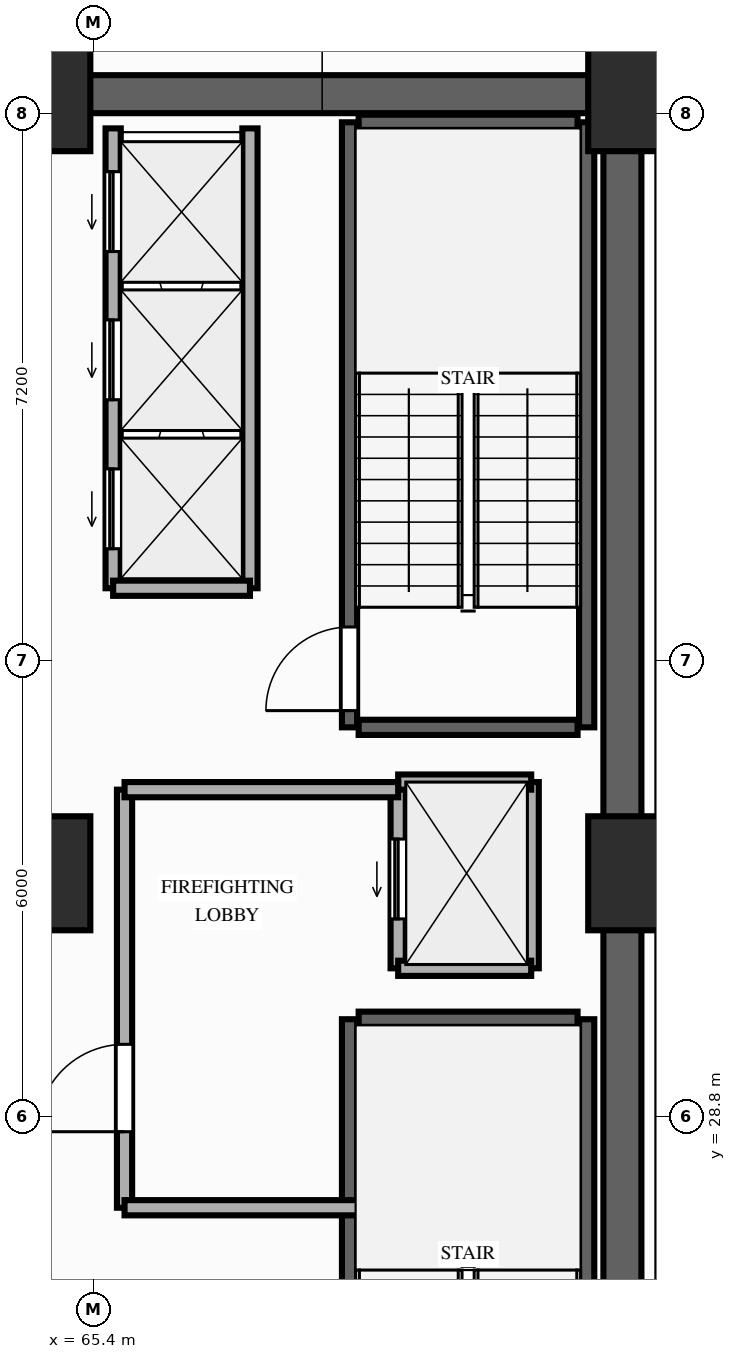
"""IFC4 building model, lengths in metres.
Left out: names, types, materials, properties, quantities, classifications, styles, units other than length and angle.
Written with IfcOpenShell. Run it as: python <this file> out.ifc"""

import sys

from ifc_helpers import new_model, si_unit, direction, frame, frame_2d, origin, origin_2d, place, context, subcontext, project, spatial, rectangle, extrude, element, fill, save


model = new_model("IFC4")
c1 = context("Model", 3, precision=1e-05, world=origin(), true_north=direction((0.0, 1.0)))
c2 = subcontext(c1, "Body", "Model", "MODEL_VIEW")
j1 = project(units=[si_unit("LENGTHUNIT", "METRE"), si_unit("PLANEANGLEUNIT", "RADIAN")], contexts=[c1])
p1 = place(None, origin())
s1 = spatial("IfcSite", under=j1, at=p1, CompositionType="ELEMENT")
p2 = place(p1, origin())
s2 = spatial("IfcBuilding", under=s1, at=p2, CompositionType="ELEMENT")
p3 = place(p2, frame((0.0, 0.0, 8.8)))
s3 = spatial("IfcBuildingStorey", under=s2, at=p3, CompositionType="ELEMENT", Elevation=8.8)
for number, where, z_axis, x_axis in (
    (1, (64.6, 32.0, 0.0), (0.0, 0.0, 1.0), (1.0, 0.0, 0.0)),
    (2, (72.65, 32.0, 0.0), (0.0, 0.0, 1.0), (1.0, 0.0, 0.0)),
    (3, (64.6, 42.25, 0.0), (0.0, 0.0, 1.0), (1.0, 0.0, 0.0)),
    (4, (72.65, 42.25, 0.0), (0.0, 0.0, 1.0), (1.0, 0.0, 0.0)),
):
    element("IfcColumn", number, at=place(p3, frame(where, z_axis=z_axis, x_axis=x_axis)), inside=s3, PredefinedType="COLUMN", context=c2, shape_type="SweptSolid", body=[
        extrude(rectangle(XDim=1.5, YDim=1.5, at=origin_2d()), origin(), (0.0, 0.0, 1.0), 4.2),
    ])
p4 = place(p3, frame((72.35, 22.0, 0.0), z_axis=(0.0, 0.0, 1.0), x_axis=(0.0, 1.0, 0.0)))
e5 = element("IfcWall", 5, at=p4, inside=s3, PredefinedType="SHEAR", context=c2, shape_type="SweptSolid", body=[
    extrude(rectangle(XDim=20.25, YDim=0.5, at=frame_2d((10.125, 0.0))), origin(), (0.0, 0.0, 1.0), 3.95),
])
p5 = place(p3, frame((64.6, 42.25, 0.0), z_axis=(0.0, 0.0, 1.0), x_axis=(1.0, 0.0, 0.0)))
e6 = element("IfcWall", 6, at=p5, inside=s3, PredefinedType="SHEAR", context=c2, shape_type="SweptSolid", body=[
    extrude(rectangle(XDim=7.5, YDim=0.5, at=frame_2d((3.75, 0.0))), origin(), (0.0, 0.0, 1.0), 3.95),
])
p6 = place(p3, frame((68.76, 22.26, 0.0), z_axis=(0.0, 0.0, 1.0), x_axis=(0.0, 1.0, 0.0)))
e7 = element("IfcWall", 7, at=p6, inside=s3, PredefinedType="SHEAR", context=c2, shape_type="SweptSolid", body=[
    extrude(rectangle(XDim=7.82, YDim=0.2, at=frame_2d((3.91, 0.0))), origin(), (0.0, 0.0, 1.0), 3.95),
])
p7 = place(p6, frame((0.22, 0.0, 0.0)))
e8 = element("IfcOpeningElement", 8, at=p7, cuts=e7, PredefinedType="OPENING", context=c2, shape_type="SweptSolid", body=[
    extrude(rectangle(XDim=1.1, YDim=2.15, at=frame_2d((0.55, 1.075))), frame((0.0, 0.11, 0.0), z_axis=(0.0, -1.0, 0.0), x_axis=(1.0, 0.0, 0.0)), (0.0, 0.0, 1.0), 0.22),
])
p8 = place(p3, frame((71.88, 22.26, 0.0), z_axis=(0.0, 0.0, 1.0), x_axis=(0.0, 1.0, 0.0)))
e9 = element("IfcWall", 9, at=p8, inside=s3, PredefinedType="SHEAR", context=c2, shape_type="SweptSolid", body=[
    extrude(rectangle(XDim=7.82, YDim=0.2, at=frame_2d((3.91, 0.0))), origin(), (0.0, 0.0, 1.0), 3.95),
])
p9 = place(p3, frame((68.88, 30.08, 0.0), z_axis=(0.0, 0.0, 1.0), x_axis=(1.0, 0.0, 0.0)))
e10 = element("IfcWall", 10, at=p9, inside=s3, PredefinedType="SHEAR", context=c2, shape_type="SweptSolid", body=[
    extrude(rectangle(XDim=2.88, YDim=0.2, at=frame_2d((1.44, 0.0))), origin(), (0.0, 0.0, 1.0), 3.95),
])
p10 = place(p3, frame((68.76, 33.92, 0.0), z_axis=(0.0, 0.0, 1.0), x_axis=(0.0, 1.0, 0.0)))
e11 = element("IfcWall", 11, at=p10, inside=s3, PredefinedType="SHEAR", context=c2, shape_type="SweptSolid", body=[
    extrude(rectangle(XDim=7.96, YDim=0.2, at=frame_2d((3.98, 0.0))), origin(), (0.0, 0.0, 1.0), 3.95),
])
p11 = place(p10, frame((0.22, 0.0, 0.0)))
e12 = element("IfcOpeningElement", 12, at=p11, cuts=e11, PredefinedType="OPENING", context=c2, shape_type="SweptSolid", body=[
    extrude(rectangle(XDim=1.1, YDim=2.15, at=frame_2d((0.55, 1.075))), frame((0.0, 0.11, 0.0), z_axis=(0.0, -1.0, 0.0), x_axis=(1.0, 0.0, 0.0)), (0.0, 0.0, 1.0), 0.22),
])
p12 = place(p3, frame((71.88, 33.92, 0.0), z_axis=(0.0, 0.0, 1.0), x_axis=(0.0, 1.0, 0.0)))
e13 = element("IfcWall", 13, at=p12, inside=s3, PredefinedType="SHEAR", context=c2, shape_type="SweptSolid", body=[
    extrude(rectangle(XDim=7.96, YDim=0.2, at=frame_2d((3.98, 0.0))), origin(), (0.0, 0.0, 1.0), 3.95),
])
for number, where, z_axis, x_axis in (
    (14, (68.88, 41.88, 0.0), (0.0, 0.0, 1.0), (1.0, 0.0, 0.0)),
    (15, (68.88, 33.92, 0.0), (0.0, 0.0, 1.0), (1.0, 0.0, 0.0)),
):
    element("IfcWall", number, at=place(p3, frame(where, z_axis=z_axis, x_axis=x_axis)), inside=s3, PredefinedType="SHEAR", context=c2, shape_type="SweptSolid", body=[
        extrude(rectangle(XDim=2.88, YDim=0.2, at=frame_2d((1.44, 0.0))), origin(), (0.0, 0.0, 1.0), 3.95),
    ])
p13 = place(p3, frame((65.65, 35.75, 0.0), z_axis=(0.0, 0.0, 1.0), x_axis=(0.0, 1.0, 0.0)))
e16 = element("IfcWall", 16, at=p13, inside=s3, PredefinedType="MOVABLE", context=c2, shape_type="SweptSolid", body=[
    extrude(rectangle(XDim=6.05, YDim=0.2, at=frame_2d((3.025, 0.0))), origin(), (0.0, 0.0, 1.0), 3.95),
])
p14 = place(p13, frame((0.52, 0.0, 0.0)))
e17 = element("IfcOpeningElement", 17, at=p14, cuts=e16, PredefinedType="OPENING", context=c2, shape_type="SweptSolid", body=[
    extrude(rectangle(XDim=1.05, YDim=2.15, at=frame_2d((0.525, 1.075))), frame((0.0, 0.11, 0.0), z_axis=(0.0, -1.0, 0.0), x_axis=(1.0, 0.0, 0.0)), (0.0, 0.0, 1.0), 0.22),
])
p15 = place(p13, frame((2.48, 0.0, 0.0)))
e18 = element("IfcOpeningElement", 18, at=p15, cuts=e16, PredefinedType="OPENING", context=c2, shape_type="SweptSolid", body=[
    extrude(rectangle(XDim=1.05, YDim=2.15, at=frame_2d((0.525, 1.075))), frame((0.0, 0.11, 0.0), z_axis=(0.0, -1.0, 0.0), x_axis=(1.0, 0.0, 0.0)), (0.0, 0.0, 1.0), 0.22),
])
p16 = place(p13, frame((4.43, 0.0, 0.0)))
e19 = element("IfcOpeningElement", 19, at=p16, cuts=e16, PredefinedType="OPENING", context=c2, shape_type="SweptSolid", body=[
    extrude(rectangle(XDim=1.05, YDim=2.15, at=frame_2d((0.525, 1.075))), frame((0.0, 0.11, 0.0), z_axis=(0.0, -1.0, 0.0), x_axis=(1.0, 0.0, 0.0)), (0.0, 0.0, 1.0), 0.22),
])
p17 = place(p3, frame((67.45, 35.75, 0.0), z_axis=(0.0, 0.0, 1.0), x_axis=(0.0, 1.0, 0.0)))
e20 = element("IfcWall", 20, at=p17, inside=s3, PredefinedType="MOVABLE", context=c2, shape_type="SweptSolid", body=[
    extrude(rectangle(XDim=6.05, YDim=0.2, at=frame_2d((3.025, 0.0))), origin(), (0.0, 0.0, 1.0), 3.95),
])
p18 = place(p3, frame((65.65, 35.75, 0.0), z_axis=(0.0, 0.0, 1.0), x_axis=(1.0, 0.0, 0.0)))
e21 = element("IfcWall", 21, at=p18, inside=s3, PredefinedType="MOVABLE", context=c2, shape_type="SweptSolid", body=[
    extrude(rectangle(XDim=1.8, YDim=0.2, at=frame_2d((0.9, 0.0))), origin(), (0.0, 0.0, 1.0), 3.95),
])
p19 = place(p3, frame((69.4, 30.75, 0.0), z_axis=(0.0, 0.0, 1.0), x_axis=(0.0, 1.0, 0.0)))
e22 = element("IfcWall", 22, at=p19, inside=s3, PredefinedType="MOVABLE", context=c2, shape_type="SweptSolid", body=[
    extrude(rectangle(XDim=2.45, YDim=0.2, at=frame_2d((1.225, 0.0))), origin(), (0.0, 0.0, 1.0), 3.95),
])
p20 = place(p19, frame((0.65, 0.0, 0.0)))
e23 = element("IfcOpeningElement", 23, at=p20, cuts=e22, PredefinedType="OPENING", context=c2, shape_type="SweptSolid", body=[
    extrude(rectangle(XDim=1.05, YDim=2.15, at=frame_2d((0.525, 1.075))), frame((0.0, 0.11, 0.0), z_axis=(0.0, -1.0, 0.0), x_axis=(1.0, 0.0, 0.0)), (0.0, 0.0, 1.0), 0.22),
])
p21 = place(p3, frame((71.15, 30.75, 0.0), z_axis=(0.0, 0.0, 1.0), x_axis=(0.0, 1.0, 0.0)))
e24 = element("IfcWall", 24, at=p21, inside=s3, PredefinedType="MOVABLE", context=c2, shape_type="SweptSolid", body=[
    extrude(rectangle(XDim=2.45, YDim=0.2, at=frame_2d((1.225, 0.0))), origin(), (0.0, 0.0, 1.0), 3.95),
])
for number, where, z_axis, x_axis in (
    (25, (69.4, 33.2, 0.0), (0.0, 0.0, 1.0), (1.0, 0.0, 0.0)),
    (26, (69.4, 30.75, 0.0), (0.0, 0.0, 1.0), (1.0, 0.0, 0.0)),
):
    element("IfcWall", number, at=place(p3, frame(where, z_axis=z_axis, x_axis=x_axis)), inside=s3, PredefinedType="MOVABLE", context=c2, shape_type="SweptSolid", body=[
        extrude(rectangle(XDim=1.75, YDim=0.2, at=frame_2d((0.875, 0.0))), origin(), (0.0, 0.0, 1.0), 3.95),
    ])
p22 = place(p3, frame((65.8, 27.6, 0.0), z_axis=(0.0, 0.0, 1.0), x_axis=(0.0, 1.0, 0.0)))
e27 = element("IfcWall", 27, at=p22, inside=s3, PredefinedType="PARTITIONING", context=c2, shape_type="SweptSolid", body=[
    extrude(rectangle(XDim=5.5, YDim=0.2, at=frame_2d((2.75, 0.0))), origin(), (0.0, 0.0, 1.0), 3.95),
])
p23 = place(p22, frame((1.0, 0.0, 0.0)))
e28 = element("IfcOpeningElement", 28, at=p23, cuts=e27, PredefinedType="OPENING", context=c2, shape_type="SweptSolid", body=[
    extrude(rectangle(XDim=1.15, YDim=2.15, at=frame_2d((0.575, 1.075))), frame((0.0, 0.11, 0.0), z_axis=(0.0, -1.0, 0.0), x_axis=(1.0, 0.0, 0.0)), (0.0, 0.0, 1.0), 0.22),
])
p24 = place(p3, frame((65.8, 33.1, 0.0), z_axis=(0.0, 0.0, 1.0), x_axis=(1.0, 0.0, 0.0)))
e29 = element("IfcWall", 29, at=p24, inside=s3, PredefinedType="PARTITIONING", context=c2, shape_type="SweptSolid", body=[
    extrude(rectangle(XDim=3.6, YDim=0.2, at=frame_2d((1.8, 0.0))), origin(), (0.0, 0.0, 1.0), 3.95),
])
p25 = place(p3, frame((65.8, 27.6, 0.0), z_axis=(0.0, 0.0, 1.0), x_axis=(1.0, 0.0, 0.0)))
e30 = element("IfcWall", 30, at=p25, inside=s3, PredefinedType="PARTITIONING", context=c2, shape_type="SweptSolid", body=[
    extrude(rectangle(XDim=3.4, YDim=0.2, at=frame_2d((1.7, 0.0))), origin(), (0.0, 0.0, 1.0), 3.95),
])
p26 = place(p11, origin())
e31 = element("IfcDoor", 31, at=p26, inside=s3, OperationType="SINGLE_SWING_LEFT", PredefinedType="DOOR", context=c2, shape_type="SweptSolid", body=[
    extrude(rectangle(XDim=1.1, YDim=2.15, at=frame_2d((0.55, 1.075))), frame((0.0, 0.025, 0.0), z_axis=(0.0, -1.0, 0.0), x_axis=(1.0, 0.0, 0.0)), (0.0, 0.0, 1.0), 0.05),
])
fill(e12, e31)
p27 = place(p14, origin())
e32 = element("IfcDoor", 32, at=p27, inside=s3, OperationType="SLIDING_TO_LEFT", PredefinedType="DOOR", context=c2, shape_type="SweptSolid", body=[
    extrude(rectangle(XDim=1.05, YDim=2.15, at=frame_2d((0.525, 1.075))), frame((0.0, 0.025, 0.0), z_axis=(0.0, -1.0, 0.0), x_axis=(1.0, 0.0, 0.0)), (0.0, 0.0, 1.0), 0.05),
])
fill(e17, e32)
p28 = place(p15, origin())
e33 = element("IfcDoor", 33, at=p28, inside=s3, OperationType="SLIDING_TO_LEFT", PredefinedType="DOOR", context=c2, shape_type="SweptSolid", body=[
    extrude(rectangle(XDim=1.05, YDim=2.15, at=frame_2d((0.525, 1.075))), frame((0.0, 0.025, 0.0), z_axis=(0.0, -1.0, 0.0), x_axis=(1.0, 0.0, 0.0)), (0.0, 0.0, 1.0), 0.05),
])
fill(e18, e33)
p29 = place(p16, origin())
e34 = element("IfcDoor", 34, at=p29, inside=s3, OperationType="SLIDING_TO_LEFT", PredefinedType="DOOR", context=c2, shape_type="SweptSolid", body=[
    extrude(rectangle(XDim=1.05, YDim=2.15, at=frame_2d((0.525, 1.075))), frame((0.0, 0.025, 0.0), z_axis=(0.0, -1.0, 0.0), x_axis=(1.0, 0.0, 0.0)), (0.0, 0.0, 1.0), 0.05),
])
fill(e19, e34)
p30 = place(p20, origin())
e35 = element("IfcDoor", 35, at=p30, inside=s3, OperationType="SLIDING_TO_LEFT", PredefinedType="DOOR", context=c2, shape_type="SweptSolid", body=[
    extrude(rectangle(XDim=1.05, YDim=2.15, at=frame_2d((0.525, 1.075))), frame((0.0, 0.025, 0.0), z_axis=(0.0, -1.0, 0.0), x_axis=(1.0, 0.0, 0.0)), (0.0, 0.0, 1.0), 0.05),
])
fill(e23, e35)
p31 = place(p23, origin())
e36 = element("IfcDoor", 36, at=p31, inside=s3, OperationType="SINGLE_SWING_LEFT", PredefinedType="DOOR", context=c2, shape_type="SweptSolid", body=[
    extrude(rectangle(XDim=1.15, YDim=2.15, at=frame_2d((0.575, 1.075))), frame((0.0, 0.025, 0.0), z_axis=(0.0, -1.0, 0.0), x_axis=(1.0, 0.0, 0.0)), (0.0, 0.0, 1.0), 0.05),
])
fill(e28, e36)
save(model, sys.argv[1])
